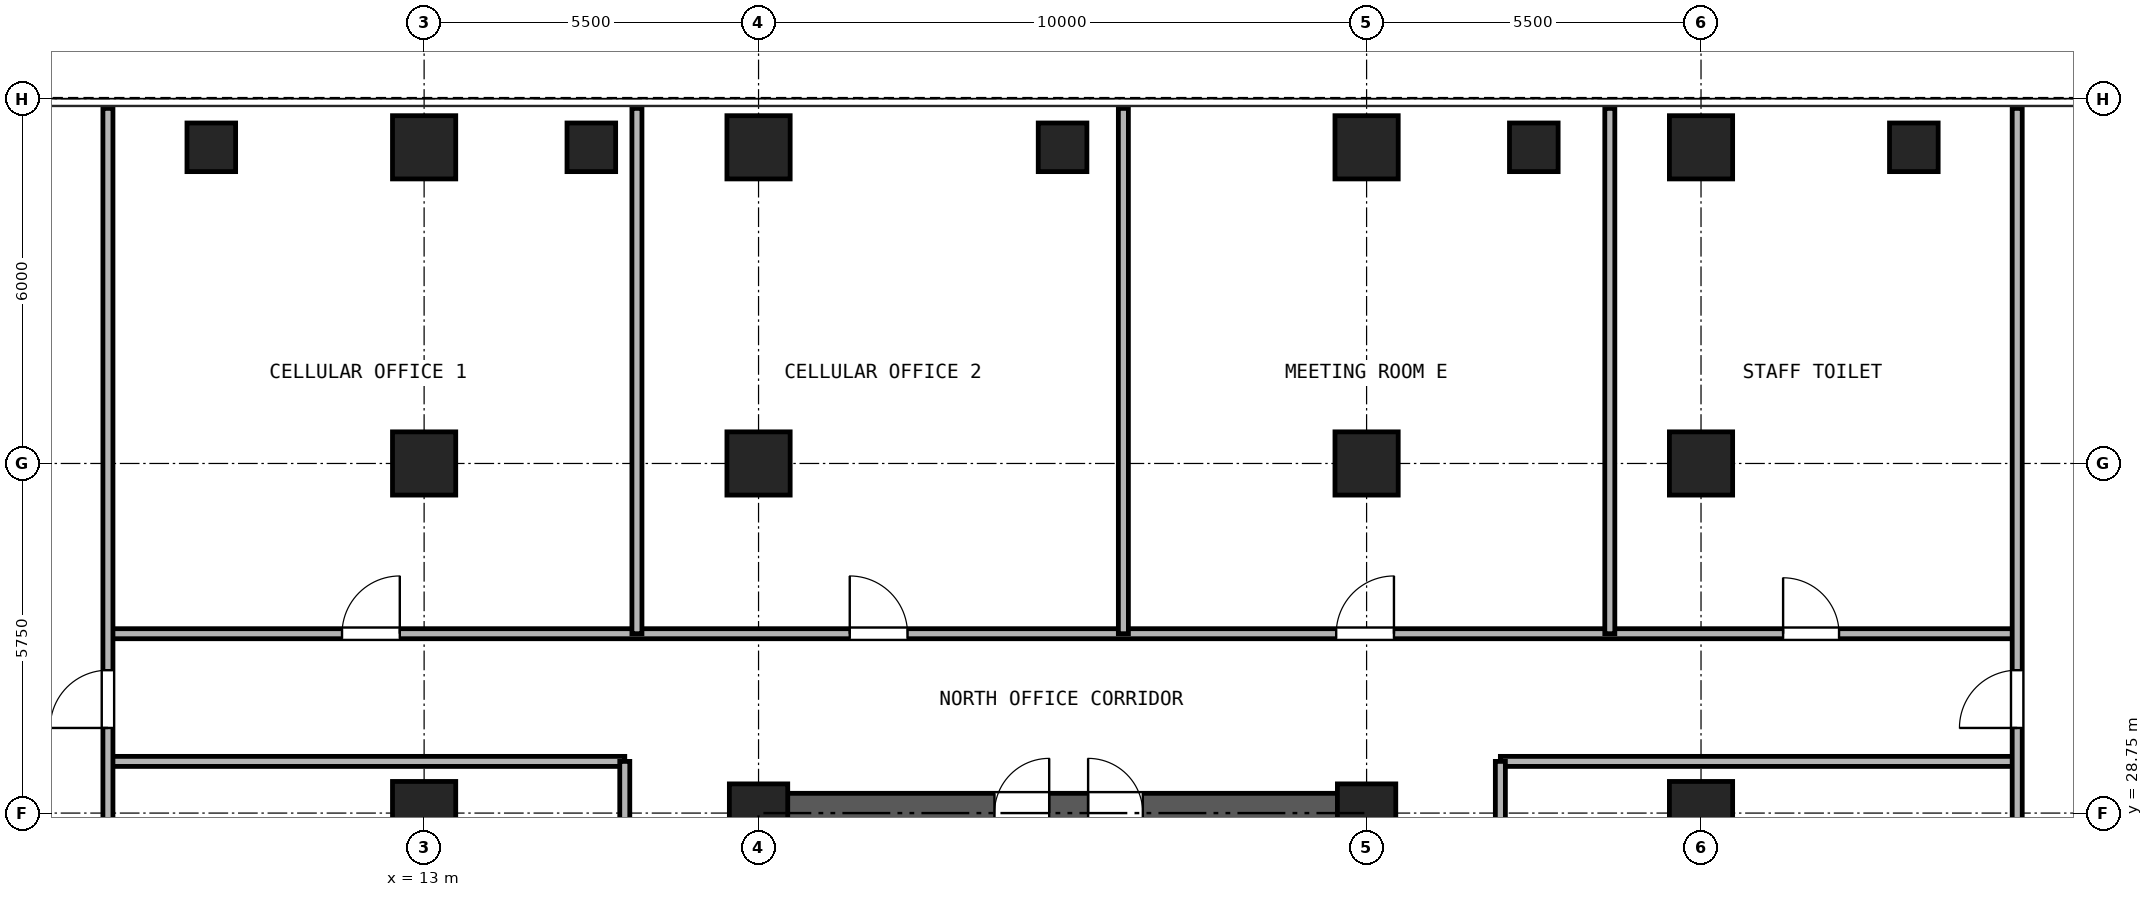
"""IFC4 building model, lengths in metres.
Left out: names, types, materials, properties, quantities, classifications, styles, units other than length and angle.
Written with IfcOpenShell. Run it as: python <this file> out.ifc"""

import sys

from ifc_helpers import new_model, si_unit, direction, frame, frame_2d, origin, origin_2d, place, context, subcontext, project, spatial, rectangle, hollow_rectangle, extrude, source, transform, mapped, element, fill, save


model = new_model("IFC4")
c1 = context("Model", 3, precision=1e-05, world=origin(), true_north=direction((0.0, 1.0)))
c2 = subcontext(c1, "Body", "Model", "MODEL_VIEW")
j1 = project(units=[si_unit("LENGTHUNIT", "METRE"), si_unit("PLANEANGLEUNIT", "RADIAN")], contexts=[c1])
p1 = place(None, origin())
s1 = spatial("IfcSite", under=j1, at=p1, CompositionType="ELEMENT")
p2 = place(p1, origin())
s2 = spatial("IfcBuilding", under=s1, at=p2, CompositionType="ELEMENT")
p3 = place(p2, frame((0.0, 0.0, 65.7)))
s3 = spatial("IfcBuildingStorey", under=s2, at=p3, CompositionType="ELEMENT", Elevation=65.7)
m1 = source(origin(), c2, "Body", "SweptSolid", [
    extrude(hollow_rectangle(XDim=1.04, YDim=1.04, WallThickness=0.065, at=origin_2d()), origin(), (0.0, 0.0, 1.0), 3.32),
])
for number, where, z_axis, x_axis in (
    (1, (13.0, 39.7, 0.0), (0.0, 0.0, 1.0), (1.0, 0.0, 0.0)),
    (2, (18.5, 39.7, 0.0), (0.0, 0.0, 1.0), (1.0, 0.0, 0.0)),
    (3, (28.5, 39.7, 0.0), (0.0, 0.0, 1.0), (1.0, 0.0, 0.0)),
    (4, (34.0, 39.7, 0.0), (0.0, 0.0, 1.0), (1.0, 0.0, 0.0)),
    (5, (13.0, 28.75, 0.0), (0.0, 0.0, 1.0), (1.0, 0.0, 0.0)),
    (6, (13.0, 34.5, 0.0), (0.0, 0.0, 1.0), (1.0, 0.0, 0.0)),
):
    element("IfcColumn", number, at=place(p3, frame(where, z_axis=z_axis, x_axis=x_axis)), inside=s3, PredefinedType="COLUMN", context=c2, shape_type="MappedRepresentation", body=[
        mapped(m1, transform((0.0, 0.0, 0.0), x_axis=(1.0, 0.0, 0.0), y_axis=(0.0, 1.0, 0.0), z_axis=(0.0, 0.0, 1.0), scale=1.0)),
    ])
m2 = source(origin(), c2, "Body", "SweptSolid", [
    extrude(hollow_rectangle(XDim=0.96, YDim=0.96, WallThickness=0.06, at=origin_2d()), origin(), (0.0, 0.0, 1.0), 3.32),
])
p4 = place(p3, frame((18.5, 28.75, 0.0), z_axis=(0.0, 0.0, 1.0), x_axis=(1.0, 0.0, 0.0)))
e7 = element("IfcColumn", 7, at=p4, inside=s3, PredefinedType="COLUMN", context=c2, shape_type="MappedRepresentation", body=[
    mapped(m2, transform((0.0, 0.0, 0.0), x_axis=(1.0, 0.0, 0.0), y_axis=(0.0, 1.0, 0.0), z_axis=(0.0, 0.0, 1.0), scale=1.0)),
])
p5 = place(p3, frame((18.5, 34.5, 0.0), z_axis=(0.0, 0.0, 1.0), x_axis=(1.0, 0.0, 0.0)))
e8 = element("IfcColumn", 8, at=p5, inside=s3, PredefinedType="COLUMN", context=c2, shape_type="MappedRepresentation", body=[
    mapped(m1, transform((0.0, 0.0, 0.0), x_axis=(1.0, 0.0, 0.0), y_axis=(0.0, 1.0, 0.0), z_axis=(0.0, 0.0, 1.0), scale=1.0)),
])
p6 = place(p3, frame((28.5, 28.75, 0.0), z_axis=(0.0, 0.0, 1.0), x_axis=(1.0, 0.0, 0.0)))
e9 = element("IfcColumn", 9, at=p6, inside=s3, PredefinedType="COLUMN", context=c2, shape_type="MappedRepresentation", body=[
    mapped(m2, transform((0.0, 0.0, 0.0), x_axis=(1.0, 0.0, 0.0), y_axis=(0.0, 1.0, 0.0), z_axis=(0.0, 0.0, 1.0), scale=1.0)),
])
for number, where, z_axis, x_axis in (
    (10, (28.5, 34.5, 0.0), (0.0, 0.0, 1.0), (1.0, 0.0, 0.0)),
    (11, (34.0, 28.75, 0.0), (0.0, 0.0, 1.0), (1.0, 0.0, 0.0)),
    (12, (34.0, 34.5, 0.0), (0.0, 0.0, 1.0), (1.0, 0.0, 0.0)),
):
    element("IfcColumn", number, at=place(p3, frame(where, z_axis=z_axis, x_axis=x_axis)), inside=s3, PredefinedType="COLUMN", context=c2, shape_type="MappedRepresentation", body=[
        mapped(m1, transform((0.0, 0.0, 0.0), x_axis=(1.0, 0.0, 0.0), y_axis=(0.0, 1.0, 0.0), z_axis=(0.0, 0.0, 1.0), scale=1.0)),
    ])
m3 = source(origin(), c2, "Body", "SweptSolid", [
    extrude(hollow_rectangle(XDim=0.8, YDim=0.8, WallThickness=0.045, at=origin_2d()), origin(), (0.0, 0.0, 1.0), 3.32),
])
for number, where, z_axis, x_axis in (
    (13, (9.5, 39.7, 0.0), (0.0, 0.0, 1.0), (1.0, 0.0, 0.0)),
    (14, (15.75, 39.7, 0.0), (0.0, 0.0, 1.0), (1.0, 0.0, 0.0)),
    (15, (23.5, 39.7, 0.0), (0.0, 0.0, 1.0), (1.0, 0.0, 0.0)),
    (16, (31.25, 39.7, 0.0), (0.0, 0.0, 1.0), (1.0, 0.0, 0.0)),
    (17, (37.5, 39.7, 0.0), (0.0, 0.0, 1.0), (1.0, 0.0, 0.0)),
):
    element("IfcColumn", number, at=place(p3, frame(where, z_axis=z_axis, x_axis=x_axis)), inside=s3, PredefinedType="COLUMN", context=c2, shape_type="MappedRepresentation", body=[
        mapped(m3, transform((0.0, 0.0, 0.0), x_axis=(1.0, 0.0, 0.0), y_axis=(0.0, 1.0, 0.0), z_axis=(0.0, 0.0, 1.0), scale=1.0)),
    ])
p7 = place(p3, frame((18.175, 28.75, 0.0), z_axis=(0.0, 0.0, 1.0), x_axis=(1.0, 0.0, 0.0)))
e18 = element("IfcWall", 18, at=p7, inside=s3, PredefinedType="SHEAR", context=c2, shape_type="SweptSolid", body=[
    extrude(rectangle(XDim=10.65, YDim=0.65, at=frame_2d((5.325, 0.0))), origin(), (0.0, 0.0, 1.0), 3.32),
])
p8 = place(p7, frame((4.205, 0.0, 0.0)))
e19 = element("IfcOpeningElement", 19, at=p8, cuts=e18, PredefinedType="OPENING", context=c2, shape_type="SweptSolid", body=[
    extrude(rectangle(XDim=0.9, YDim=2.05, at=frame_2d((0.45, 1.025))), frame((0.0, 0.335, 0.0), z_axis=(0.0, -1.0, 0.0), x_axis=(1.0, 0.0, 0.0)), (0.0, 0.0, 1.0), 0.67),
])
p9 = place(p7, frame((5.745, 0.0, 0.0)))
e20 = element("IfcOpeningElement", 20, at=p9, cuts=e18, PredefinedType="OPENING", context=c2, shape_type="SweptSolid", body=[
    extrude(rectangle(XDim=0.9, YDim=2.05, at=frame_2d((0.45, 1.025))), frame((0.0, 0.335, 0.0), z_axis=(0.0, -1.0, 0.0), x_axis=(1.0, 0.0, 0.0)), (0.0, 0.0, 1.0), 0.67),
])
p10 = place(p3, frame((7.8, 31.7, 0.0), z_axis=(0.0, 0.0, 1.0), x_axis=(1.0, 0.0, 0.0)))
e21 = element("IfcWall", 21, at=p10, inside=s3, PredefinedType="PARTITIONING", context=c2, shape_type="SweptSolid", body=[
    extrude(rectangle(XDim=31.4, YDim=0.165, at=frame_2d((15.7, 0.0))), origin(), (0.0, 0.0, 1.0), 2.898),
])
p11 = place(p10, frame((3.85, 0.0, 0.0)))
e22 = element("IfcOpeningElement", 22, at=p11, cuts=e21, PredefinedType="OPENING", context=c2, shape_type="SweptSolid", body=[
    extrude(rectangle(XDim=0.95, YDim=2.15, at=frame_2d((0.475, 1.075))), frame((0.0, 0.093, 0.0), z_axis=(0.0, -1.0, 0.0), x_axis=(1.0, 0.0, 0.0)), (0.0, 0.0, 1.0), 0.185),
])
p12 = place(p10, frame((12.2, 0.0, 0.0)))
e23 = element("IfcOpeningElement", 23, at=p12, cuts=e21, PredefinedType="OPENING", context=c2, shape_type="SweptSolid", body=[
    extrude(rectangle(XDim=0.95, YDim=2.15, at=frame_2d((0.475, 1.075))), frame((0.0, 0.093, 0.0), z_axis=(0.0, -1.0, 0.0), x_axis=(1.0, 0.0, 0.0)), (0.0, 0.0, 1.0), 0.185),
])
p13 = place(p10, frame((20.2, 0.0, 0.0)))
e24 = element("IfcOpeningElement", 24, at=p13, cuts=e21, PredefinedType="OPENING", context=c2, shape_type="SweptSolid", body=[
    extrude(rectangle(XDim=0.95, YDim=2.15, at=frame_2d((0.475, 1.075))), frame((0.0, 0.093, 0.0), z_axis=(0.0, -1.0, 0.0), x_axis=(1.0, 0.0, 0.0)), (0.0, 0.0, 1.0), 0.185),
])
p14 = place(p10, frame((27.55, 0.0, 0.0)))
e25 = element("IfcOpeningElement", 25, at=p14, cuts=e21, PredefinedType="OPENING", context=c2, shape_type="SweptSolid", body=[
    extrude(rectangle(XDim=0.92, YDim=2.1, at=frame_2d((0.46, 1.05))), frame((0.0, 0.093, 0.0), z_axis=(0.0, -1.0, 0.0), x_axis=(1.0, 0.0, 0.0)), (0.0, 0.0, 1.0), 0.185),
])
for number, where, z_axis, x_axis in (
    (26, (7.8, 29.6, 0.0), (0.0, 0.0, 1.0), (1.0, 0.0, 0.0)),
    (27, (30.7, 29.6, 0.0), (0.0, 0.0, 1.0), (1.0, 0.0, 0.0)),
):
    element("IfcWall", number, at=place(p3, frame(where, z_axis=z_axis, x_axis=x_axis)), inside=s3, PredefinedType="PARTITIONING", context=c2, shape_type="SweptSolid", body=[
        extrude(rectangle(XDim=8.5, YDim=0.165, at=frame_2d((4.25, 0.0))), origin(), (0.0, 0.0, 1.0), 3.32),
    ])
p15 = place(p3, frame((16.3, 10.7, 0.0), z_axis=(0.0, 0.0, 1.0), x_axis=(0.0, 1.0, 0.0)))
e28 = element("IfcWall", 28, at=p15, inside=s3, PredefinedType="PARTITIONING", context=c2, shape_type="SweptSolid", body=[
    extrude(rectangle(XDim=18.9, YDim=0.165, at=frame_2d((9.45, 0.0))), origin(), (0.0, 0.0, 1.0), 3.32),
])
p16 = place(p15, frame((5.611, 0.0, 0.0)))
e29 = element("IfcOpeningElement", 29, at=p16, cuts=e28, PredefinedType="OPENING", context=c2, shape_type="SweptSolid", body=[
    extrude(rectangle(XDim=0.95, YDim=2.15, at=frame_2d((0.475, 1.075))), frame((0.0, 0.093, 0.0), z_axis=(0.0, -1.0, 0.0), x_axis=(1.0, 0.0, 0.0)), (0.0, 0.0, 1.0), 0.185),
])
p17 = place(p15, frame((15.061, 0.0, 0.0)))
e30 = element("IfcOpeningElement", 30, at=p17, cuts=e28, PredefinedType="OPENING", context=c2, shape_type="SweptSolid", body=[
    extrude(rectangle(XDim=0.95, YDim=2.15, at=frame_2d((0.475, 1.075))), frame((0.0, 0.093, 0.0), z_axis=(0.0, -1.0, 0.0), x_axis=(1.0, 0.0, 0.0)), (0.0, 0.0, 1.0), 0.185),
])
p18 = place(p3, frame((30.7, 10.7, 0.0), z_axis=(0.0, 0.0, 1.0), x_axis=(0.0, 1.0, 0.0)))
e31 = element("IfcWall", 31, at=p18, inside=s3, PredefinedType="PARTITIONING", context=c2, shape_type="SweptSolid", body=[
    extrude(rectangle(XDim=18.9, YDim=0.165, at=frame_2d((9.45, 0.0))), origin(), (0.0, 0.0, 1.0), 3.32),
])
p19 = place(p18, frame((8.95, 0.0, 0.0)))
e32 = element("IfcOpeningElement", 32, at=p19, cuts=e31, PredefinedType="OPENING", context=c2, shape_type="SweptSolid", body=[
    extrude(rectangle(XDim=0.95, YDim=2.15, at=frame_2d((0.475, 1.075))), frame((0.0, 0.093, 0.0), z_axis=(0.0, -1.0, 0.0), x_axis=(1.0, 0.0, 0.0)), (0.0, 0.0, 1.0), 0.185),
])
p20 = place(p3, frame((7.8, 0.16, 0.0), z_axis=(0.0, 0.0, 1.0), x_axis=(0.0, 1.0, 0.0)))
e33 = element("IfcWall", 33, at=p20, inside=s3, PredefinedType="PARTITIONING", context=c2, shape_type="SweptSolid", body=[
    extrude(rectangle(XDim=40.18, YDim=0.165, at=frame_2d((20.09, 0.0))), origin(), (0.0, 0.0, 1.0), 3.32),
])
p21 = place(p20, frame((8.99, 0.0, 0.0)))
e34 = element("IfcOpeningElement", 34, at=p21, cuts=e33, PredefinedType="OPENING", context=c2, shape_type="SweptSolid", body=[
    extrude(rectangle(XDim=0.95, YDim=2.15, at=frame_2d((0.475, 1.075))), frame((0.0, 0.093, 0.0), z_axis=(0.0, -1.0, 0.0), x_axis=(1.0, 0.0, 0.0)), (0.0, 0.0, 1.0), 0.185),
])
p22 = place(p20, frame((29.99, 0.0, 0.0)))
e35 = element("IfcOpeningElement", 35, at=p22, cuts=e33, PredefinedType="OPENING", context=c2, shape_type="SweptSolid", body=[
    extrude(rectangle(XDim=0.95, YDim=2.15, at=frame_2d((0.475, 1.075))), frame((0.0, 0.093, 0.0), z_axis=(0.0, -1.0, 0.0), x_axis=(1.0, 0.0, 0.0)), (0.0, 0.0, 1.0), 0.185),
])
p23 = place(p3, frame((39.2, 0.16, 0.0), z_axis=(0.0, 0.0, 1.0), x_axis=(0.0, 1.0, 0.0)))
e36 = element("IfcWall", 36, at=p23, inside=s3, PredefinedType="PARTITIONING", context=c2, shape_type="SweptSolid", body=[
    extrude(rectangle(XDim=40.18, YDim=0.165, at=frame_2d((20.09, 0.0))), origin(), (0.0, 0.0, 1.0), 3.32),
])
p24 = place(p23, frame((8.99, 0.0, 0.0)))
e37 = element("IfcOpeningElement", 37, at=p24, cuts=e36, PredefinedType="OPENING", context=c2, shape_type="SweptSolid", body=[
    extrude(rectangle(XDim=0.95, YDim=2.15, at=frame_2d((0.475, 1.075))), frame((0.0, 0.093, 0.0), z_axis=(0.0, -1.0, 0.0), x_axis=(1.0, 0.0, 0.0)), (0.0, 0.0, 1.0), 0.185),
])
p25 = place(p23, frame((29.99, 0.0, 0.0)))
e38 = element("IfcOpeningElement", 38, at=p25, cuts=e36, PredefinedType="OPENING", context=c2, shape_type="SweptSolid", body=[
    extrude(rectangle(XDim=0.95, YDim=2.15, at=frame_2d((0.475, 1.075))), frame((0.0, 0.093, 0.0), z_axis=(0.0, -1.0, 0.0), x_axis=(1.0, 0.0, 0.0)), (0.0, 0.0, 1.0), 0.185),
])
for number, where, z_axis, x_axis in (
    (39, (16.5, 31.7, 0.0), (0.0, 0.0, 1.0), (0.0, 1.0, 0.0)),
    (40, (24.5, 31.7, 0.0), (0.0, 0.0, 1.0), (0.0, 1.0, 0.0)),
    (41, (32.5, 31.7, 0.0), (0.0, 0.0, 1.0), (0.0, 1.0, 0.0)),
):
    element("IfcWall", number, at=place(p3, frame(where, z_axis=z_axis, x_axis=x_axis)), inside=s3, PredefinedType="PARTITIONING", context=c2, shape_type="SweptSolid", body=[
        extrude(rectangle(XDim=8.64, YDim=0.165, at=frame_2d((4.32, 0.0))), origin(), (0.0, 0.0, 1.0), 3.32),
    ])
p26 = place(p8, origin())
e42 = element("IfcDoor", 42, at=p26, inside=s3, OperationType="SINGLE_SWING_RIGHT", PredefinedType="DOOR", context=c2, shape_type="SweptSolid", body=[
    extrude(rectangle(XDim=0.9, YDim=2.05, at=frame_2d((0.45, 1.025))), frame((0.0, 0.025, 0.0), z_axis=(0.0, -1.0, 0.0), x_axis=(1.0, 0.0, 0.0)), (0.0, 0.0, 1.0), 0.05),
])
fill(e19, e42)
p27 = place(p9, origin())
e43 = element("IfcDoor", 43, at=p27, inside=s3, OperationType="SINGLE_SWING_LEFT", PredefinedType="DOOR", context=c2, shape_type="SweptSolid", body=[
    extrude(rectangle(XDim=0.9, YDim=2.05, at=frame_2d((0.45, 1.025))), frame((0.0, 0.025, 0.0), z_axis=(0.0, -1.0, 0.0), x_axis=(1.0, 0.0, 0.0)), (0.0, 0.0, 1.0), 0.05),
])
fill(e20, e43)
p28 = place(p11, origin())
e44 = element("IfcDoor", 44, at=p28, inside=s3, OperationType="SINGLE_SWING_RIGHT", PredefinedType="DOOR", context=c2, shape_type="SweptSolid", body=[
    extrude(rectangle(XDim=0.95, YDim=2.15, at=frame_2d((0.475, 1.075))), frame((0.0, 0.025, 0.0), z_axis=(0.0, -1.0, 0.0), x_axis=(1.0, 0.0, 0.0)), (0.0, 0.0, 1.0), 0.05),
])
fill(e22, e44)
p29 = place(p12, origin())
e45 = element("IfcDoor", 45, at=p29, inside=s3, OperationType="SINGLE_SWING_LEFT", PredefinedType="DOOR", context=c2, shape_type="SweptSolid", body=[
    extrude(rectangle(XDim=0.95, YDim=2.15, at=frame_2d((0.475, 1.075))), frame((0.0, 0.025, 0.0), z_axis=(0.0, -1.0, 0.0), x_axis=(1.0, 0.0, 0.0)), (0.0, 0.0, 1.0), 0.05),
])
fill(e23, e45)
p30 = place(p13, origin())
e46 = element("IfcDoor", 46, at=p30, inside=s3, OperationType="SINGLE_SWING_RIGHT", PredefinedType="DOOR", context=c2, shape_type="SweptSolid", body=[
    extrude(rectangle(XDim=0.95, YDim=2.15, at=frame_2d((0.475, 1.075))), frame((0.0, 0.025, 0.0), z_axis=(0.0, -1.0, 0.0), x_axis=(1.0, 0.0, 0.0)), (0.0, 0.0, 1.0), 0.05),
])
fill(e24, e46)
p31 = place(p14, origin())
e47 = element("IfcDoor", 47, at=p31, inside=s3, OperationType="SINGLE_SWING_LEFT", PredefinedType="DOOR", context=c2, shape_type="SweptSolid", body=[
    extrude(rectangle(XDim=0.92, YDim=2.1, at=frame_2d((0.46, 1.05))), frame((0.0, 0.025, 0.0), z_axis=(0.0, -1.0, 0.0), x_axis=(1.0, 0.0, 0.0)), (0.0, 0.0, 1.0), 0.05),
])
fill(e25, e47)
p32 = place(p22, frame((0.95, 0.0, 0.0), z_axis=(0.0, 0.0, 1.0), x_axis=(-1.0, 0.0, 0.0)))
e48 = element("IfcDoor", 48, at=p32, inside=s3, OperationType="SINGLE_SWING_LEFT", PredefinedType="DOOR", context=c2, shape_type="SweptSolid", body=[
    extrude(rectangle(XDim=0.95, YDim=2.15, at=frame_2d((0.475, 1.075))), frame((0.0, 0.025, 0.0), z_axis=(0.0, -1.0, 0.0), x_axis=(1.0, 0.0, 0.0)), (0.0, 0.0, 1.0), 0.05),
])
fill(e35, e48)
p33 = place(p25, origin())
e49 = element("IfcDoor", 49, at=p33, inside=s3, OperationType="SINGLE_SWING_LEFT", PredefinedType="DOOR", context=c2, shape_type="SweptSolid", body=[
    extrude(rectangle(XDim=0.95, YDim=2.15, at=frame_2d((0.475, 1.075))), frame((0.0, 0.025, 0.0), z_axis=(0.0, -1.0, 0.0), x_axis=(1.0, 0.0, 0.0)), (0.0, 0.0, 1.0), 0.05),
])
fill(e38, e49)
save(model, sys.argv[1])
